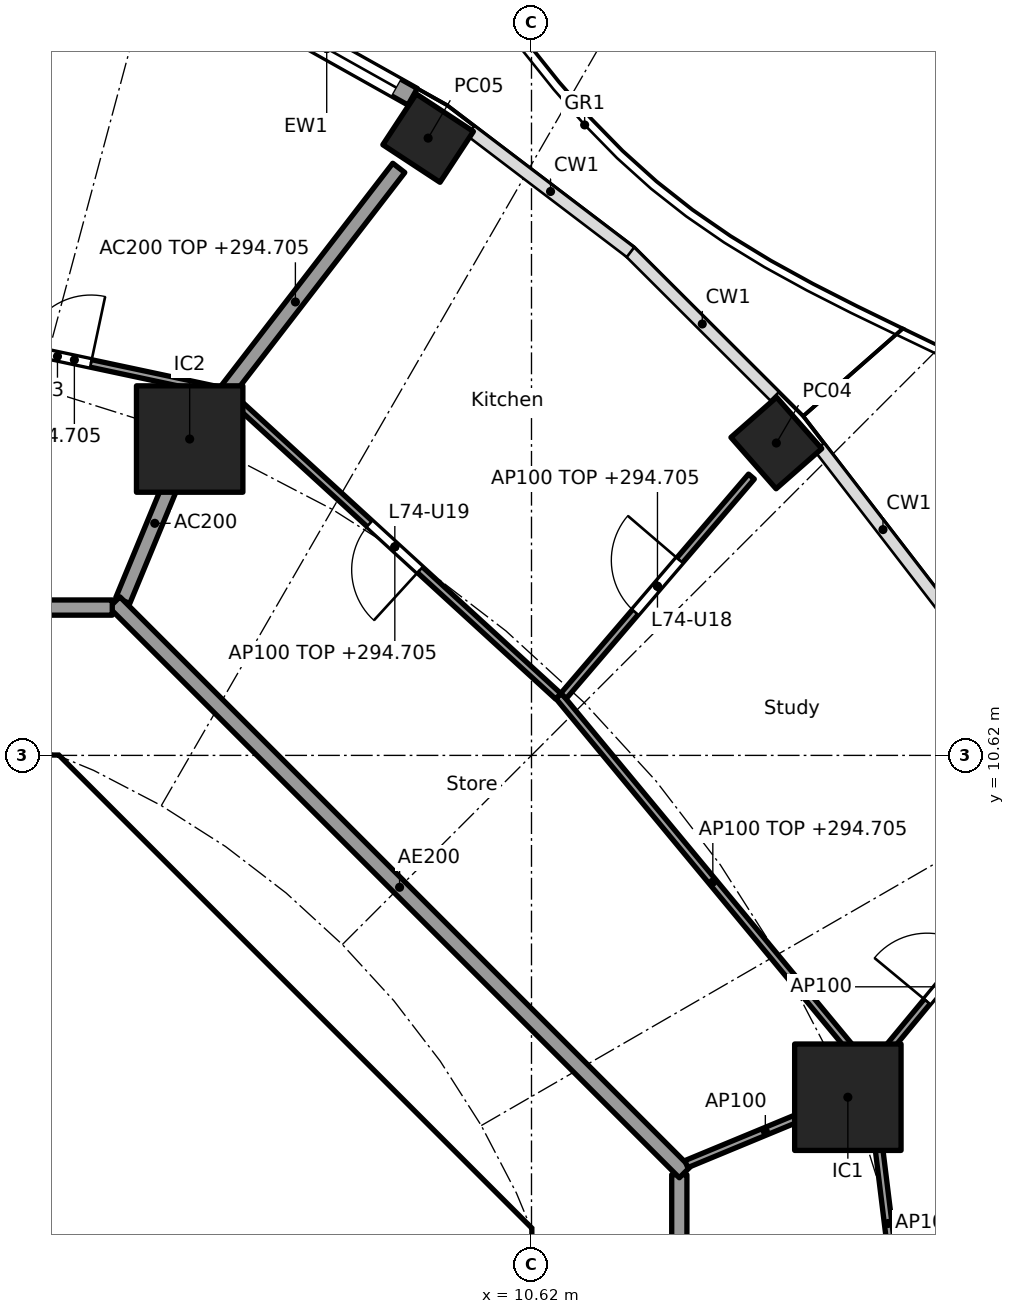
"""IFC4 building model, lengths in metres.
Left out: names, types, materials, properties, quantities, classifications, styles, units other than length and angle.
Written with IfcOpenShell. Run it as: python <this file> out.ifc"""

import sys

from ifc_helpers import new_model, si_unit, direction, frame, frame_2d, origin, origin_2d, place, context, subcontext, project, spatial, polyline, rectangle, hollow_rectangle, outline, extrude, element, fill, save


model = new_model("IFC4")
c1 = context("Model", 3, precision=1e-05, world=origin(), true_north=direction((0.0, 1.0)))
c2 = subcontext(c1, "Body", "Model", "MODEL_VIEW")
j1 = project(units=[si_unit("LENGTHUNIT", "METRE"), si_unit("PLANEANGLEUNIT", "RADIAN")], contexts=[c1])
p1 = place(None, origin())
s1 = spatial("IfcSite", under=j1, at=p1, CompositionType="ELEMENT")
p2 = place(p1, origin())
s2 = spatial("IfcBuilding", under=s1, at=p2, CompositionType="ELEMENT")
p3 = place(p2, frame((0.0, 0.0, 291.8)))
s3 = spatial("IfcBuildingStorey", under=s2, at=p3, CompositionType="ELEMENT", Elevation=291.8)
for number, where, z_axis, x_axis in (
    (1, (13.841, 14.73, 0.0), (0.0, 0.0, 1.0), (-0.66, 0.751, 0.0)),
    (2, (9.26, 18.741, 0.0), (0.0, 0.0, 1.0), (-0.836, 0.549, 0.0)),
):
    element("IfcColumn", number, at=place(p3, frame(where, z_axis=z_axis, x_axis=x_axis)), inside=s3, PredefinedType="COLUMN", context=c2, shape_type="SweptSolid", body=[
        extrude(hollow_rectangle(XDim=0.9, YDim=0.8, WallThickness=0.028, at=origin_2d()), origin(), (0.0, 0.0, 1.0), 3.7),
    ])
for number, where, z_axis, x_axis in (
    (3, (14.782, 6.123, 0.0), (0.0, 0.0, 1.0), (1.0, 0.0, 0.0)),
    (4, (6.123, 14.782, 0.0), (0.0, 0.0, 1.0), (1.0, 0.0, 0.0)),
):
    element("IfcColumn", number, at=place(p3, frame(where, z_axis=z_axis, x_axis=x_axis)), inside=s3, PredefinedType="COLUMN", context=c2, shape_type="SweptSolid", body=[
        extrude(rectangle(XDim=1.4, YDim=1.4, at=origin_2d()), origin(), (0.0, 0.0, 1.0), 3.7),
    ])
p4 = place(p3, frame((6.795, 20.554, 0.0), z_axis=(0.0, 0.0, 1.0), x_axis=(0.872052877201, -0.489411666561, 0.0)))
e5 = element("IfcWall", 5, at=p4, inside=s3, PredefinedType="SOLIDWALL", context=c2, shape_type="SweptSolid", body=[
    extrude(rectangle(XDim=2.593, YDim=0.25, at=frame_2d((1.296, 0.0))), origin(), (0.0, 0.0, 1.0), 3.44),
])
p5 = place(p4, frame((0.247, 0.0, 0.0)))
e6 = element("IfcOpeningElement", 6, at=p5, cuts=e5, PredefinedType="OPENING", context=c2, shape_type="SweptSolid", body=[
    extrude(rectangle(XDim=2.1, YDim=2.4, at=frame_2d((1.05, 1.2))), frame((0.0, 0.135, 0.0), z_axis=(0.0, -1.0, 0.0), x_axis=(1.0, 0.0, 0.0)), (0.0, 0.0, 1.0), 0.27),
])
p6 = place(p3, frame((9.988, 4.613, 0.0), z_axis=(0.0, 0.0, 1.0), x_axis=(-0.707106781187, 0.707106781187, 0.0)))
e7 = element("IfcWall", 7, at=p6, inside=s3, PredefinedType="SHEAR", context=c2, shape_type="SweptSolid", body=[
    extrude(rectangle(XDim=7.602, YDim=0.6, at=frame_2d((3.801, 0.0))), origin(), (0.0, 0.0, 1.0), 3.44),
])
p7 = place(p6, frame((3.201, 0.0, 0.0)))
e8 = element("IfcOpeningElement", 8, at=p7, cuts=e7, PredefinedType="OPENING", context=c2, shape_type="SweptSolid", body=[
    extrude(rectangle(XDim=1.2, YDim=2.1, at=frame_2d((0.6, 1.05))), frame((0.0, 0.31, 0.0), z_axis=(0.0, -1.0, 0.0), x_axis=(1.0, 0.0, 0.0)), (0.0, 0.0, 1.0), 0.62),
])
p8 = place(p3, origin())
e9 = element("IfcWall", 9, at=p8, inside=s3, PredefinedType="SHEAR", context=c2, shape_type="SweptSolid", body=[
    extrude(outline(polyline([(-4.152, 10.025), (-4.401, 9.776), (-4.825, 10.2), (-4.401, 10.625), (4.401, 10.625), (4.825, 10.2), (4.401, 9.776), (4.152, 10.025), (-4.152, 10.025)])), origin(), (0.0, 0.0, 1.0), 3.44),
])
p9 = place(p3, origin())
e10 = element("IfcWall", 10, at=p9, inside=s3, PredefinedType="SHEAR", context=c2, shape_type="SweptSolid", body=[
    extrude(outline(polyline([(9.776, -4.401), (10.025, -4.152), (10.025, -3.801), (10.025, 4.152), (9.776, 4.401), (10.2, 4.825), (10.625, 4.401), (10.625, -4.401), (10.2, -4.825), (9.776, -4.401)])), origin(), (0.0, 0.0, 1.0), 3.44),
])
p10 = place(p3, frame((5.243, 12.657, 0.0), z_axis=(0.0, 0.0, 1.0), x_axis=(0.382691608661, 0.923876145736, 0.0)))
e11 = element("IfcWall", 11, at=p10, inside=s3, PredefinedType="PARTITIONING", context=c2, shape_type="SweptSolid", body=[
    extrude(rectangle(XDim=2.2, YDim=0.2, at=frame_2d((1.1, 0.0))), origin(), (0.0, 0.0, 1.0), 3.44),
])
p11 = place(p3, frame((6.154, 14.822, 0.0), z_axis=(0.0, 0.0, 1.0), x_axis=(0.610687612043, 0.791871606068, 0.0)))
e12 = element("IfcWall", 12, at=p11, inside=s3, PredefinedType="PARTITIONING", context=c2, shape_type="SweptSolid", body=[
    extrude(rectangle(XDim=4.455, YDim=0.2, at=frame_2d((2.228, 0.0))), origin(), (0.0, 0.0, 1.0), 2.905),
])
p12 = place(p3, frame((12.565, -5.104, 0.0), z_axis=(0.0, 0.0, 1.0), x_axis=(0.0, 1.0, 0.0)))
e13 = element("IfcWall", 13, at=p12, inside=s3, PredefinedType="PARTITIONING", context=c2, shape_type="SweptSolid", body=[
    extrude(rectangle(XDim=10.209, YDim=0.2, at=frame_2d((5.104, 0.0))), origin(), (0.0, 0.0, 1.0), 3.44),
])
p13 = place(p12, frame((4.604, 0.0, 0.0)))
e14 = element("IfcOpeningElement", 14, at=p13, cuts=e13, PredefinedType="OPENING", context=c2, shape_type="SweptSolid", body=[
    extrude(rectangle(XDim=1.0, YDim=2.1, at=frame_2d((0.5, 1.05))), frame((0.0, 0.11, 0.0), z_axis=(0.0, -1.0, 0.0), x_axis=(1.0, 0.0, 0.0)), (0.0, 0.0, 1.0), 0.22),
])
p14 = place(p3, frame((12.635, 5.134, 0.0), z_axis=(0.0, 0.0, 1.0), x_axis=(-0.707106781187, 0.707106781187, 0.0)))
e15 = element("IfcWall", 15, at=p14, inside=s3, PredefinedType="PARTITIONING", context=c2, shape_type="SweptSolid", body=[
    extrude(rectangle(XDim=10.609, YDim=0.2, at=frame_2d((5.305, 0.0))), origin(), (0.0, 0.0, 1.0), 3.44),
])
p15 = place(p3, frame((5.104, 12.565, 0.0), z_axis=(0.0, 0.0, 1.0), x_axis=(-1.0, 0.0, 0.0)))
e16 = element("IfcWall", 16, at=p15, inside=s3, PredefinedType="PARTITIONING", context=c2, shape_type="SweptSolid", body=[
    extrude(rectangle(XDim=10.409, YDim=0.2, at=frame_2d((5.205, 0.0))), origin(), (0.0, 0.0, 1.0), 3.44),
])
p16 = place(p15, frame((6.339, 0.0, 0.0)))
e17 = element("IfcOpeningElement", 17, at=p16, cuts=e16, PredefinedType="OPENING", context=c2, shape_type="SweptSolid", body=[
    extrude(rectangle(XDim=1.0, YDim=2.1, at=frame_2d((0.5, 1.05))), frame((0.0, 0.11, 0.0), z_axis=(0.0, -1.0, 0.0), x_axis=(1.0, 0.0, 0.0)), (0.0, 0.0, 1.0), 0.22),
])
p17 = place(p3, frame((15.552, 2.508, 0.0), z_axis=(0.0, 0.0, 1.0), x_axis=(-0.12196631785, 0.992534239868, 0.0)))
e18 = element("IfcWall", 18, at=p17, inside=s3, PredefinedType="PARTITIONING", context=c2, shape_type="SweptSolid", body=[
    extrude(rectangle(XDim=3.937, YDim=0.1, at=frame_2d((1.969, 0.0))), origin(), (0.0, 0.0, 1.0), 2.905),
])
p18 = place(p3, frame((12.657, 5.243, 0.0), z_axis=(0.0, 0.0, 1.0), x_axis=(0.923864733477, 0.382719158442, 0.0)))
e19 = element("IfcWall", 19, at=p18, inside=s3, PredefinedType="PARTITIONING", context=c2, shape_type="SweptSolid", body=[
    extrude(rectangle(XDim=2.25, YDim=0.1, at=frame_2d((1.125, 0.0))), origin(), (0.0, 0.0, 1.0), 3.44),
])
p19 = place(p3, frame((14.814, 6.161, 0.0), z_axis=(0.0, 0.0, 1.0), x_axis=(0.638050520313, 0.769994502272, 0.0)))
e20 = element("IfcWall", 20, at=p19, inside=s3, PredefinedType="PARTITIONING", context=c2, shape_type="SweptSolid", body=[
    extrude(rectangle(XDim=3.673, YDim=0.1, at=frame_2d((1.836, 0.0))), origin(), (0.0, 0.0, 1.0), 3.44),
])
p20 = place(p19, frame((1.584, 0.0, 0.0)))
e21 = element("IfcOpeningElement", 21, at=p20, cuts=e20, PredefinedType="OPENING", context=c2, shape_type="SweptSolid", body=[
    extrude(rectangle(XDim=0.9, YDim=2.1, at=frame_2d((0.45, 1.05))), frame((0.0, 0.06, 0.0), z_axis=(0.0, -1.0, 0.0), x_axis=(1.0, 0.0, 0.0)), (0.0, 0.0, 1.0), 0.12),
])
p21 = place(p3, frame((15.034, 6.504, 0.0), z_axis=(0.0, 0.0, 1.0), x_axis=(-0.637935278767, 0.770089981823, 0.0)))
e22 = element("IfcWall", 22, at=p21, inside=s3, PredefinedType="PARTITIONING", context=c2, shape_type="SweptSolid", body=[
    extrude(rectangle(XDim=6.361, YDim=0.1, at=frame_2d((3.18, 0.0))), origin(), (0.0, 0.0, 1.0), 2.905),
])
p22 = place(p3, frame((11.041, 11.402, 0.0), z_axis=(0.0, 0.0, 1.0), x_axis=(0.650558544325, 0.759456108282, 0.0)))
e23 = element("IfcWall", 23, at=p22, inside=s3, PredefinedType="PARTITIONING", context=c2, shape_type="SweptSolid", body=[
    extrude(rectangle(XDim=3.8, YDim=0.1, at=frame_2d((1.9, 0.0))), origin(), (0.0, 0.0, 1.0), 2.905),
])
p23 = place(p22, frame((1.45, 0.0, 0.0)))
e24 = element("IfcOpeningElement", 24, at=p23, cuts=e23, PredefinedType="OPENING", context=c2, shape_type="SweptSolid", body=[
    extrude(rectangle(XDim=0.9, YDim=2.1, at=frame_2d((0.45, 1.05))), frame((0.0, 0.06, 0.0), z_axis=(0.0, -1.0, 0.0), x_axis=(1.0, 0.0, 0.0)), (0.0, 0.0, 1.0), 0.12),
])
p24 = place(p3, frame((10.972, 11.398, 0.0), z_axis=(0.0, 0.0, 1.0), x_axis=(-0.737830272434, 0.674986288069, 0.0)))
e25 = element("IfcWall", 25, at=p24, inside=s3, PredefinedType="PARTITIONING", context=c2, shape_type="SweptSolid", body=[
    extrude(rectangle(XDim=5.827, YDim=0.1, at=frame_2d((2.914, 0.0))), origin(), (0.0, 0.0, 1.0), 2.905),
])
p25 = place(p24, frame((2.464, 0.0, 0.0)))
e26 = element("IfcOpeningElement", 26, at=p25, cuts=e25, PredefinedType="OPENING", context=c2, shape_type="SweptSolid", body=[
    extrude(rectangle(XDim=0.9, YDim=2.1, at=frame_2d((0.45, 1.05))), frame((0.0, 0.06, 0.0), z_axis=(0.0, -1.0, 0.0), x_axis=(1.0, 0.0, 0.0)), (0.0, 0.0, 1.0), 0.12),
])
p26 = place(p3, frame((6.5, 15.419, 0.0), z_axis=(0.0, 0.0, 1.0), x_axis=(-0.978053492557, 0.208353943321, 0.0)))
e27 = element("IfcWall", 27, at=p26, inside=s3, PredefinedType="PARTITIONING", context=c2, shape_type="SweptSolid", body=[
    extrude(rectangle(XDim=3.874, YDim=0.1, at=frame_2d((1.937, 0.0))), origin(), (0.0, 0.0, 1.0), 2.905),
])
p27 = place(p26, frame((1.714, 0.0, 0.0)))
e28 = element("IfcOpeningElement", 28, at=p27, cuts=e27, PredefinedType="OPENING", context=c2, shape_type="SweptSolid", body=[
    extrude(rectangle(XDim=0.9, YDim=2.1, at=frame_2d((0.45, 1.05))), frame((0.0, 0.06, 0.0), z_axis=(0.0, -1.0, 0.0), x_axis=(1.0, 0.0, 0.0)), (0.0, 0.0, 1.0), 0.12),
])
p28 = place(p5, origin())
e29 = element("IfcDoor", 29, at=p28, inside=s3, OperationType="SLIDING_TO_LEFT", PredefinedType="DOOR", context=c2, shape_type="SweptSolid", body=[
    extrude(rectangle(XDim=2.1, YDim=2.4, at=frame_2d((1.05, 1.2))), frame((0.0, 0.025, 0.0), z_axis=(0.0, -1.0, 0.0), x_axis=(1.0, 0.0, 0.0)), (0.0, 0.0, 1.0), 0.05),
])
fill(e6, e29)
p29 = place(p7, origin())
e30 = element("IfcDoor", 30, at=p29, inside=s3, OperationType="SINGLE_SWING_RIGHT", PredefinedType="DOOR", context=c2, shape_type="SweptSolid", body=[
    extrude(rectangle(XDim=1.2, YDim=2.1, at=frame_2d((0.6, 1.05))), frame((0.0, 0.025, 0.0), z_axis=(0.0, -1.0, 0.0), x_axis=(1.0, 0.0, 0.0)), (0.0, 0.0, 1.0), 0.05),
])
fill(e8, e30)
p30 = place(p20, origin())
e31 = element("IfcDoor", 31, at=p30, inside=s3, OperationType="SINGLE_SWING_LEFT", PredefinedType="DOOR", context=c2, shape_type="SweptSolid", body=[
    extrude(rectangle(XDim=0.9, YDim=2.1, at=frame_2d((0.45, 1.05))), frame((0.0, 0.025, 0.0), z_axis=(0.0, -1.0, 0.0), x_axis=(1.0, 0.0, 0.0)), (0.0, 0.0, 1.0), 0.05),
])
fill(e21, e31)
p31 = place(p23, origin())
e32 = element("IfcDoor", 32, at=p31, inside=s3, OperationType="SINGLE_SWING_RIGHT", PredefinedType="DOOR", context=c2, shape_type="SweptSolid", body=[
    extrude(rectangle(XDim=0.9, YDim=2.1, at=frame_2d((0.45, 1.05))), frame((0.0, 0.025, 0.0), z_axis=(0.0, -1.0, 0.0), x_axis=(1.0, 0.0, 0.0)), (0.0, 0.0, 1.0), 0.05),
])
fill(e24, e32)
p32 = place(p25, origin())
e33 = element("IfcDoor", 33, at=p32, inside=s3, OperationType="SINGLE_SWING_LEFT", PredefinedType="DOOR", context=c2, shape_type="SweptSolid", body=[
    extrude(rectangle(XDim=0.9, YDim=2.1, at=frame_2d((0.45, 1.05))), frame((0.0, 0.025, 0.0), z_axis=(0.0, -1.0, 0.0), x_axis=(1.0, 0.0, 0.0)), (0.0, 0.0, 1.0), 0.05),
])
fill(e26, e33)
p33 = place(p27, frame((0.9, 0.0, 0.0), x_axis=(-1.0, 0.0, 0.0)))
e34 = element("IfcDoor", 34, at=p33, inside=s3, OperationType="SINGLE_SWING_RIGHT", PredefinedType="DOOR", context=c2, shape_type="SweptSolid", body=[
    extrude(rectangle(XDim=0.9, YDim=2.1, at=frame_2d((0.45, 1.05))), frame((0.0, 0.025, 0.0), z_axis=(0.0, -1.0, 0.0), x_axis=(1.0, 0.0, 0.0)), (0.0, 0.0, 1.0), 0.05),
])
fill(e28, e34)
save(model, sys.argv[1])
